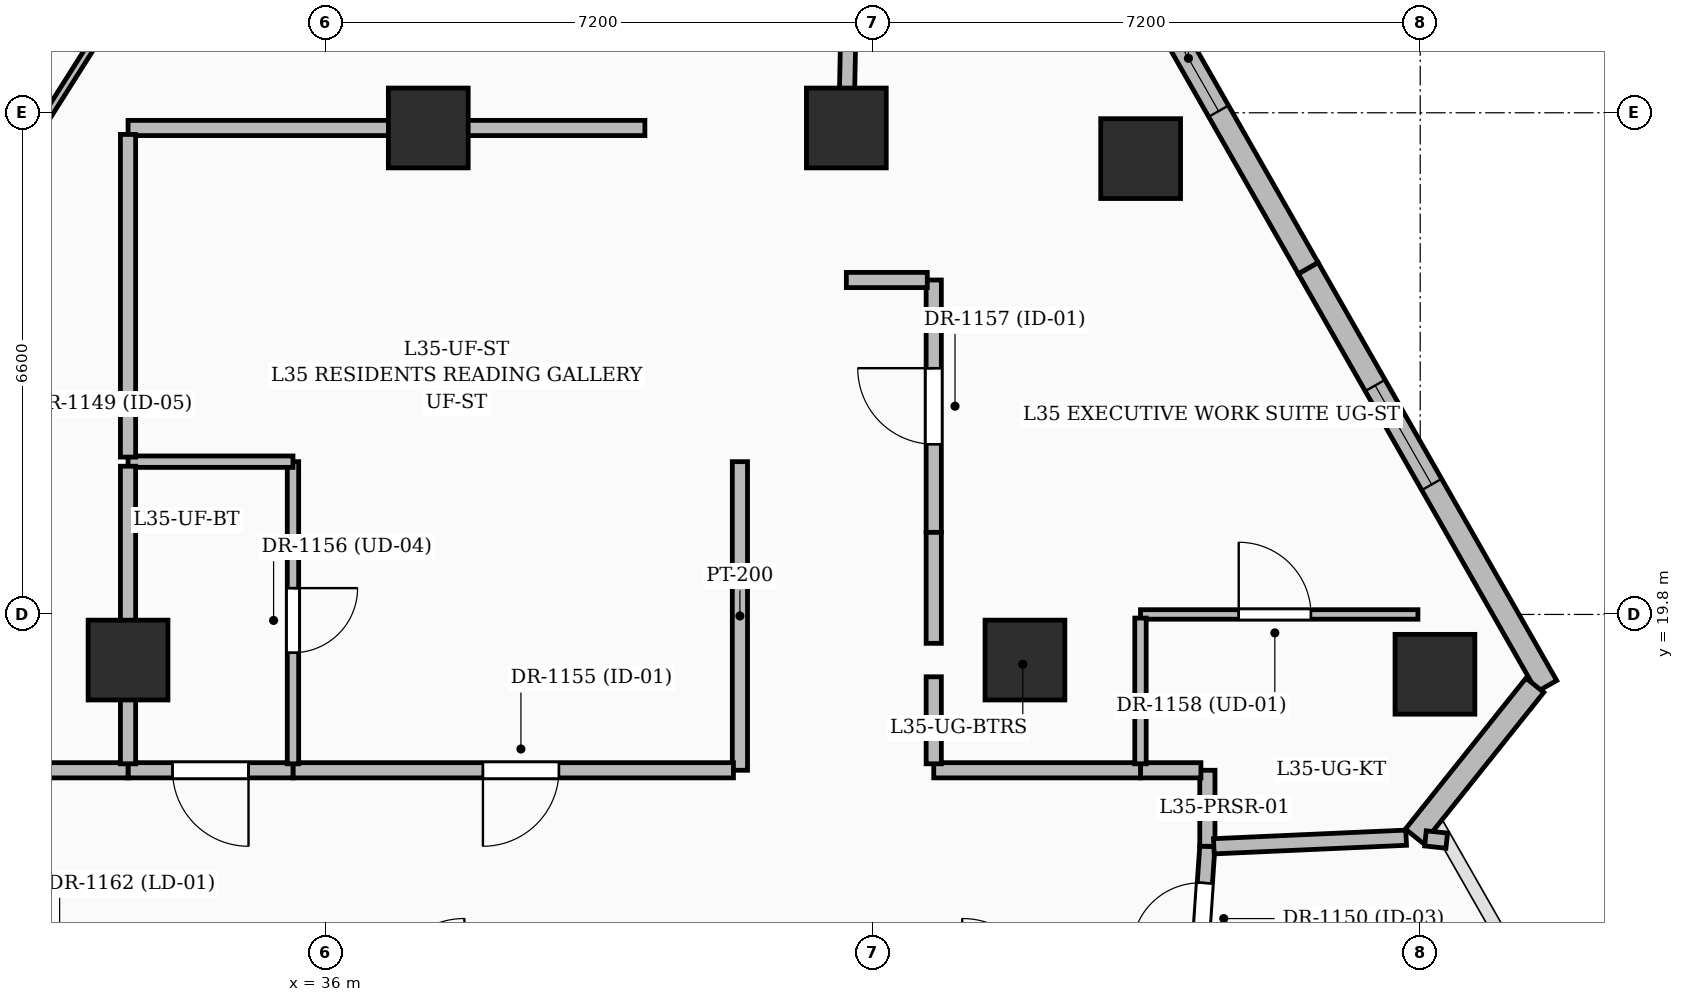
"""IFC4 building model, lengths in metres.
Left out: names, types, materials, properties, quantities, classifications, styles, units other than length and angle.
Written with IfcOpenShell. Run it as: python <this file> out.ifc"""

import sys

from ifc_helpers import new_model, si_unit, direction, frame, frame_2d, origin, origin_2d, place, context, subcontext, project, spatial, rectangle, extrude, element, fill, save


model = new_model("IFC4")
c1 = context("Model", 3, precision=1e-05, world=origin(), true_north=direction((0.0, 1.0)))
c2 = subcontext(c1, "Body", "Model", "MODEL_VIEW")
j1 = project(units=[si_unit("LENGTHUNIT", "METRE"), si_unit("PLANEANGLEUNIT", "RADIAN")], contexts=[c1])
p1 = place(None, origin())
s1 = spatial("IfcSite", under=j1, at=p1, CompositionType="ELEMENT")
p2 = place(p1, origin())
s2 = spatial("IfcBuilding", under=s1, at=p2, CompositionType="ELEMENT")
p3 = place(p2, frame((0.0, 0.0, 139.2)))
s3 = spatial("IfcBuildingStorey", under=s2, at=p3, CompositionType="ELEMENT", Elevation=139.2)
for number, where, z_axis, x_axis in (
    (1, (45.2, 19.2, 0.0), (0.0, 0.0, 1.0), (1.0, 0.0, 0.0)),
    (2, (42.85, 26.2, 0.0), (0.0, 0.0, 1.0), (1.0, 0.0, 0.0)),
    (3, (37.35, 26.2, 0.0), (0.0, 0.0, 1.0), (1.0, 0.0, 0.0)),
    (4, (33.4, 19.2, 0.0), (0.0, 0.0, 1.0), (1.0, 0.0, 0.0)),
    (5, (50.594, 19.013, 0.0), (0.0, 0.0, 1.0), (1.0, 0.0, 0.0)),
    (6, (46.722, 25.797, 0.0), (0.0, 0.0, 1.0), (1.0, 0.0, 0.0)),
):
    element("IfcColumn", number, at=place(p3, frame(where, z_axis=z_axis, x_axis=x_axis)), inside=s3, PredefinedType="COLUMN", context=c2, shape_type="SweptSolid", body=[
        extrude(rectangle(XDim=1.05, YDim=1.05, at=origin_2d()), origin(), (0.0, 0.0, 1.0), 3.6),
    ])
p4 = place(p3, frame((45.79, 29.852, 0.0), z_axis=(0.0, 0.0, 1.0), x_axis=(0.495702771017, -0.868492235317, 0.0)))
e7 = element("IfcWall", 7, at=p4, inside=s3, PredefinedType="SOLIDWALL", context=c2, shape_type="SweptSolid", body=[
    extrude(rectangle(XDim=6.33, YDim=0.3, at=frame_2d((3.165, 0.0))), origin(), (0.0, 0.0, 1.0), 3.35),
])
p5 = place(p4, frame((2.35, 0.0, 0.55)))
e8 = element("IfcOpeningElement", 8, at=p5, cuts=e7, PredefinedType="OPENING", context=c2, shape_type="SweptSolid", body=[
    extrude(rectangle(XDim=1.6, YDim=2.2, at=frame_2d((0.8, 1.1))), frame((0.0, 0.16, 0.0), z_axis=(0.0, -1.0, 0.0), x_axis=(1.0, 0.0, 0.0)), (0.0, 0.0, 1.0), 0.32),
])
p6 = place(p3, frame((48.927, 24.354, 0.0), z_axis=(0.0, 0.0, 1.0), x_axis=(0.495702771017, -0.868492235317, 0.0)))
e9 = element("IfcWall", 9, at=p6, inside=s3, PredefinedType="SOLIDWALL", context=c2, shape_type="SweptSolid", body=[
    extrude(rectangle(XDim=6.33, YDim=0.3, at=frame_2d((3.165, 0.0))), origin(), (0.0, 0.0, 1.0), 3.35),
])
p7 = place(p6, frame((1.775, 0.0, 0.6)))
e10 = element("IfcOpeningElement", 10, at=p7, cuts=e9, PredefinedType="OPENING", context=c2, shape_type="SweptSolid", body=[
    extrude(rectangle(XDim=1.5, YDim=2.1, at=frame_2d((0.75, 1.05))), frame((0.0, 0.16, 0.0), z_axis=(0.0, -1.0, 0.0), x_axis=(1.0, 0.0, 0.0)), (0.0, 0.0, 1.0), 0.32),
])
p8 = place(p3, frame((51.909, 18.869, 0.0), z_axis=(0.0, 0.0, 1.0), x_axis=(-0.624062389724, -0.781374515666, 0.0)))
e11 = element("IfcWall", 11, at=p8, inside=s3, PredefinedType="SOLIDWALL", context=c2, shape_type="SweptSolid", body=[
    extrude(rectangle(XDim=2.542, YDim=0.3, at=frame_2d((1.271, 0.0))), origin(), (0.0, 0.0, 1.0), 2.575),
])
p9 = place(p3, frame((51.449, 15.334, 0.0), z_axis=(0.0, 0.0, 1.0), x_axis=(0.990155518745, 0.139971599617, 0.0)))
e12 = element("IfcWall", 12, at=p9, inside=s3, PredefinedType="SOLIDWALL", context=c2, shape_type="SweptSolid", body=[
    extrude(rectangle(XDim=2.594, YDim=0.3, at=frame_2d((1.297, 0.0))), origin(), (0.0, 0.0, 1.0), 2.575),
])
p10 = place(p3, frame((47.425, 14.2, 0.0), z_axis=(0.0, 0.0, 1.0), x_axis=(0.068484119878, 0.997652206595, 0.0)))
e13 = element("IfcWall", 13, at=p10, inside=s3, PredefinedType="PARTITIONING", context=c2, shape_type="SweptSolid", body=[
    extrude(rectangle(XDim=2.556, YDim=0.2, at=frame_2d((1.278, 0.0))), origin(), (0.0, 0.0, 1.0), 2.393),
])
p11 = place(p10, frame((1.172, 0.0, 0.0)))
e14 = element("IfcOpeningElement", 14, at=p11, cuts=e13, PredefinedType="OPENING", context=c2, shape_type="SweptSolid", body=[
    extrude(rectangle(XDim=0.9, YDim=2.1, at=frame_2d((0.45, 1.05))), frame((0.0, 0.11, 0.0), z_axis=(0.0, -1.0, 0.0), x_axis=(1.0, 0.0, 0.0)), (0.0, 0.0, 1.0), 0.22),
])
p12 = place(p3, frame((41.45, 21.81, 0.0), z_axis=(0.0, 0.0, 1.0), x_axis=(0.0, -1.0, 0.0)))
e15 = element("IfcWall", 15, at=p12, inside=s3, PredefinedType="PARTITIONING", context=c2, shape_type="SweptSolid", body=[
    extrude(rectangle(XDim=4.06, YDim=0.2, at=frame_2d((2.03, 0.0))), origin(), (0.0, 0.0, 1.0), 3.35),
])
p13 = place(p3, frame((41.365, 17.75, 0.0), z_axis=(0.0, 0.0, 1.0), x_axis=(-1.0, 0.0, 0.0)))
e16 = element("IfcWall", 16, at=p13, inside=s3, PredefinedType="PARTITIONING", context=c2, shape_type="SweptSolid", body=[
    extrude(rectangle(XDim=5.795, YDim=0.2, at=frame_2d((2.897, 0.0))), origin(), (0.0, 0.0, 1.0), 3.35),
])
p14 = place(p13, frame((2.296, 0.0, 0.0)))
e17 = element("IfcOpeningElement", 17, at=p14, cuts=e16, PredefinedType="OPENING", context=c2, shape_type="SweptSolid", body=[
    extrude(rectangle(XDim=1.0, YDim=2.2, at=frame_2d((0.5, 1.1))), frame((0.0, 0.11, 0.0), z_axis=(0.0, -1.0, 0.0), x_axis=(1.0, 0.0, 0.0)), (0.0, 0.0, 1.0), 0.22),
])
p15 = place(p3, frame((35.57, 17.75, 0.0), z_axis=(0.0, 0.0, 1.0), x_axis=(-1.0, 0.0, 0.0)))
e18 = element("IfcWall", 18, at=p15, inside=s3, PredefinedType="PARTITIONING", context=c2, shape_type="SweptSolid", body=[
    extrude(rectangle(XDim=2.17, YDim=0.2, at=frame_2d((1.085, 0.0))), origin(), (0.0, 0.0, 1.0), 2.436),
])
p16 = place(p15, frame((0.585, 0.0, 0.0)))
e19 = element("IfcOpeningElement", 19, at=p16, cuts=e18, PredefinedType="OPENING", context=c2, shape_type="SweptSolid", body=[
    extrude(rectangle(XDim=1.0, YDim=2.2, at=frame_2d((0.5, 1.1))), frame((0.0, 0.11, 0.0), z_axis=(0.0, -1.0, 0.0), x_axis=(1.0, 0.0, 0.0)), (0.0, 0.0, 1.0), 0.22),
])
p17 = place(p3, frame((44.0, 20.88, 0.0), z_axis=(0.0, 0.0, 1.0), x_axis=(0.0, 1.0, 0.0)))
e20 = element("IfcWall", 20, at=p17, inside=s3, PredefinedType="PARTITIONING", context=c2, shape_type="SweptSolid", body=[
    extrude(rectangle(XDim=3.32, YDim=0.2, at=frame_2d((1.66, 0.0))), origin(), (0.0, 0.0, 1.0), 2.436),
])
p18 = place(p17, frame((1.16, 0.0, 0.0)))
e21 = element("IfcOpeningElement", 21, at=p18, cuts=e20, PredefinedType="OPENING", context=c2, shape_type="SweptSolid", body=[
    extrude(rectangle(XDim=1.0, YDim=2.2, at=frame_2d((0.5, 1.1))), frame((0.0, 0.11, 0.0), z_axis=(0.0, -1.0, 0.0), x_axis=(1.0, 0.0, 0.0)), (0.0, 0.0, 1.0), 0.22),
])
p19 = place(p3, frame((43.915, 24.2, 0.0), z_axis=(0.0, 0.0, 1.0), x_axis=(-1.0, 0.0, 0.0)))
e22 = element("IfcWall", 22, at=p19, inside=s3, PredefinedType="PARTITIONING", context=c2, shape_type="SweptSolid", body=[
    extrude(rectangle(XDim=1.065, YDim=0.2, at=frame_2d((0.532, 0.0))), origin(), (0.0, 0.0, 1.0), 2.436),
])
p20 = place(p3, frame((47.6, 16.75, 0.0), z_axis=(0.0, 0.0, 1.0), x_axis=(0.0, 1.0, 0.0)))
e23 = element("IfcWall", 23, at=p20, inside=s3, PredefinedType="PARTITIONING", context=c2, shape_type="SweptSolid", body=[
    extrude(rectangle(XDim=1.0, YDim=0.2, at=frame_2d((0.5, 0.0))), origin(), (0.0, 0.0, 1.0), 3.35),
])
p21 = place(p3, frame((47.515, 17.75, 0.0), z_axis=(0.0, 0.0, 1.0), x_axis=(-1.0, 0.0, 0.0)))
e24 = element("IfcWall", 24, at=p21, inside=s3, PredefinedType="PARTITIONING", context=c2, shape_type="SweptSolid", body=[
    extrude(rectangle(XDim=0.795, YDim=0.2, at=frame_2d((0.397, 0.0))), origin(), (0.0, 0.0, 1.0), 3.35),
])
p22 = place(p3, frame((46.72, 17.75, 0.0), z_axis=(0.0, 0.0, 1.0), x_axis=(-1.0, 0.0, 0.0)))
e25 = element("IfcWall", 25, at=p22, inside=s3, PredefinedType="PARTITIONING", context=c2, shape_type="SweptSolid", body=[
    extrude(rectangle(XDim=2.72, YDim=0.2, at=frame_2d((1.36, 0.0))), origin(), (0.0, 0.0, 1.0), 2.436),
])
p23 = place(p3, frame((44.0, 17.835, 0.0), z_axis=(0.0, 0.0, 1.0), x_axis=(0.0, 1.0, 0.0)))
e26 = element("IfcWall", 26, at=p23, inside=s3, PredefinedType="PARTITIONING", context=c2, shape_type="SweptSolid", body=[
    extrude(rectangle(XDim=1.145, YDim=0.2, at=frame_2d((0.573, 0.0))), origin(), (0.0, 0.0, 1.0), 3.35),
])
p24 = place(p3, frame((33.4, 17.75, 0.0), z_axis=(0.0, 0.0, 1.0), x_axis=(-1.0, 0.0, 0.0)))
e27 = element("IfcWall", 27, at=p24, inside=s3, PredefinedType="PARTITIONING", context=c2, shape_type="SweptSolid", body=[
    extrude(rectangle(XDim=1.45, YDim=0.2, at=frame_2d((0.725, 0.0))), origin(), (0.0, 0.0, 1.0), 3.35),
])
p25 = place(p3, frame((50.215, 16.863, 0.0), z_axis=(0.0, 0.0, 1.0), x_axis=(-0.999003421761, -0.04463365669, 0.0)))
e28 = element("IfcWall", 28, at=p25, inside=s3, PredefinedType="PARTITIONING", context=c2, shape_type="SweptSolid", body=[
    extrude(rectangle(XDim=2.532, YDim=0.2, at=frame_2d((1.266, 0.0))), origin(), (0.0, 0.0, 1.0), 2.393),
])
p26 = place(p3, frame((50.749, 16.824, 0.0), z_axis=(0.0, 0.0, 1.0), x_axis=(-0.994299311312, 0.106624947944, 0.0)))
e29 = element("IfcWall", 29, at=p26, inside=s3, PredefinedType="PARTITIONING", context=c2, shape_type="SweptSolid", body=[
    extrude(rectangle(XDim=0.282, YDim=0.2, at=frame_2d((0.141, 0.0))), origin(), (0.0, 0.0, 1.0), 3.35),
])
p27 = place(p3, frame((35.57, 21.81, 0.0), z_axis=(0.0, 0.0, 1.0), x_axis=(0.0, -1.0, 0.0)))
e30 = element("IfcWall", 30, at=p27, inside=s3, PredefinedType="PARTITIONING", context=c2, shape_type="SweptSolid", body=[
    extrude(rectangle(XDim=3.975, YDim=0.15, at=frame_2d((1.988, 0.0))), origin(), (0.0, 0.0, 1.0), 3.35),
])
p28 = place(p27, frame((1.664, 0.0, 0.0)))
e31 = element("IfcOpeningElement", 31, at=p28, cuts=e30, PredefinedType="OPENING", context=c2, shape_type="SweptSolid", body=[
    extrude(rectangle(XDim=0.85, YDim=2.1, at=frame_2d((0.425, 1.05))), frame((0.0, 0.085, 0.0), z_axis=(0.0, -1.0, 0.0), x_axis=(1.0, 0.0, 0.0)), (0.0, 0.0, 1.0), 0.17),
])
p29 = place(p3, frame((33.4, 21.81, 0.0), z_axis=(0.0, 0.0, 1.0), x_axis=(1.0, 0.0, 0.0)))
e32 = element("IfcWall", 32, at=p29, inside=s3, PredefinedType="PARTITIONING", context=c2, shape_type="SweptSolid", body=[
    extrude(rectangle(XDim=2.17, YDim=0.15, at=frame_2d((1.085, 0.0))), origin(), (0.0, 0.0, 1.0), 2.436),
])
p30 = place(p3, frame((40.2, 26.2, 0.0), z_axis=(0.0, 0.0, 1.0), x_axis=(-1.0, 0.0, 0.0)))
e33 = element("IfcWall", 33, at=p30, inside=s3, PredefinedType="PARTITIONING", context=c2, shape_type="SweptSolid", body=[
    extrude(rectangle(XDim=6.8, YDim=0.2, at=frame_2d((3.4, 0.0))), origin(), (0.0, 0.0, 1.0), 2.436),
])
p31 = place(p3, frame((33.4, 26.115, 0.0), z_axis=(0.0, 0.0, 1.0), x_axis=(0.0, -1.0, 0.0)))
e34 = element("IfcWall", 34, at=p31, inside=s3, PredefinedType="PARTITIONING", context=c2, shape_type="SweptSolid", body=[
    extrude(rectangle(XDim=4.245, YDim=0.2, at=frame_2d((2.123, 0.0))), origin(), (0.0, 0.0, 1.0), 2.712),
])
p32 = place(p3, frame((33.4, 21.75, 0.0), z_axis=(0.0, 0.0, 1.0), x_axis=(0.0, -1.0, 0.0)))
e35 = element("IfcWall", 35, at=p32, inside=s3, PredefinedType="PARTITIONING", context=c2, shape_type="SweptSolid", body=[
    extrude(rectangle(XDim=3.915, YDim=0.2, at=frame_2d((1.958, 0.0))), origin(), (0.0, 0.0, 1.0), 2.436),
])
p33 = place(p3, frame((46.72, 19.8, 0.0), z_axis=(0.0, 0.0, 1.0), x_axis=(1.0, 0.0, 0.0)))
e36 = element("IfcWall", 36, at=p33, inside=s3, PredefinedType="PARTITIONING", context=c2, shape_type="SweptSolid", body=[
    extrude(rectangle(XDim=3.65, YDim=0.125, at=frame_2d((1.825, 0.0))), origin(), (0.0, 0.0, 1.0), 2.57),
])
p34 = place(p33, frame((1.292, 0.0, 0.0)))
e37 = element("IfcOpeningElement", 37, at=p34, cuts=e36, PredefinedType="OPENING", context=c2, shape_type="SweptSolid", body=[
    extrude(rectangle(XDim=0.95, YDim=2.2, at=frame_2d((0.475, 1.1))), frame((0.0, 0.072, 0.0), z_axis=(0.0, -1.0, 0.0), x_axis=(1.0, 0.0, 0.0)), (0.0, 0.0, 1.0), 0.145),
])
p35 = place(p3, frame((43.013, 34.402, 0.0), z_axis=(0.0, 0.0, 1.0), x_axis=(-0.019849642377, -0.99980297644, 0.0)))
e38 = element("IfcWall", 38, at=p35, inside=s3, PredefinedType="PARTITIONING", context=c2, shape_type="SweptSolid", body=[
    extrude(rectangle(XDim=8.204, YDim=0.2, at=frame_2d((4.102, 0.0))), origin(), (0.0, 0.0, 1.0), 2.393),
])
p36 = place(p3, frame((46.72, 19.752, 0.0), z_axis=(0.0, 0.0, 1.0), x_axis=(0.0, -1.0, 0.0)))
e39 = element("IfcWall", 39, at=p36, inside=s3, PredefinedType="PARTITIONING", context=c2, shape_type="SweptSolid", body=[
    extrude(rectangle(XDim=1.917, YDim=0.15, at=frame_2d((0.959, 0.0))), origin(), (0.0, 0.0, 1.0), 3.35),
])
p37 = place(p3, frame((31.015, 24.272, 0.0), z_axis=(0.0, 0.0, 1.0), x_axis=(0.534598518798, 0.8451061612, 0.0)))
e40 = element("IfcWall", 40, at=p37, inside=s3, PredefinedType="PARTITIONING", context=c2, shape_type="SweptSolid", body=[
    extrude(rectangle(XDim=17.547, YDim=0.1, at=frame_2d((8.773, 0.0))), origin(), (0.0, 0.0, 1.0), 2.393),
])
p38 = place(p3, frame((44.0, 19.42, 0.0), z_axis=(0.0, 0.0, 1.0), x_axis=(0.0, 1.0, 0.0)))
e41 = element("IfcWall", 41, at=p38, inside=s3, PredefinedType="PARTITIONING", context=c2, shape_type="SweptSolid", body=[
    extrude(rectangle(XDim=1.46, YDim=0.2, at=frame_2d((0.73, 0.0))), origin(), (0.0, 0.0, 1.0), 3.35),
])
p39 = place(p5, origin())
e42 = element("IfcWindow", 42, at=p39, inside=s3, PartitioningType="SINGLE_PANEL", PredefinedType="WINDOW", context=c2, shape_type="SweptSolid", body=[
    extrude(rectangle(XDim=1.6, YDim=2.2, at=frame_2d((0.8, 1.1))), frame((0.0, 0.03, 0.0), z_axis=(0.0, -1.0, 0.0), x_axis=(1.0, 0.0, 0.0)), (0.0, 0.0, 1.0), 0.06),
])
fill(e8, e42)
p40 = place(p7, origin())
e43 = element("IfcWindow", 43, at=p40, inside=s3, PartitioningType="SINGLE_PANEL", PredefinedType="WINDOW", context=c2, shape_type="SweptSolid", body=[
    extrude(rectangle(XDim=1.5, YDim=2.1, at=frame_2d((0.75, 1.05))), frame((0.0, 0.03, 0.0), z_axis=(0.0, -1.0, 0.0), x_axis=(1.0, 0.0, 0.0)), (0.0, 0.0, 1.0), 0.06),
])
fill(e10, e43)
p41 = place(p11, origin())
e44 = element("IfcDoor", 44, at=p41, inside=s3, OperationType="SINGLE_SWING_LEFT", PredefinedType="DOOR", context=c2, shape_type="SweptSolid", body=[
    extrude(rectangle(XDim=0.9, YDim=2.1, at=frame_2d((0.45, 1.05))), frame((0.0, 0.025, 0.0), z_axis=(0.0, -1.0, 0.0), x_axis=(1.0, 0.0, 0.0)), (0.0, 0.0, 1.0), 0.05),
])
fill(e14, e44)
p42 = place(p14, origin())
e45 = element("IfcDoor", 45, at=p42, inside=s3, OperationType="SINGLE_SWING_RIGHT", PredefinedType="DOOR", context=c2, shape_type="SweptSolid", body=[
    extrude(rectangle(XDim=1.0, YDim=2.2, at=frame_2d((0.5, 1.1))), frame((0.0, 0.025, 0.0), z_axis=(0.0, -1.0, 0.0), x_axis=(1.0, 0.0, 0.0)), (0.0, 0.0, 1.0), 0.05),
])
fill(e17, e45)
p43 = place(p28, origin())
e46 = element("IfcDoor", 46, at=p43, inside=s3, OperationType="SINGLE_SWING_LEFT", PredefinedType="DOOR", context=c2, shape_type="SweptSolid", body=[
    extrude(rectangle(XDim=0.85, YDim=2.1, at=frame_2d((0.425, 1.05))), frame((0.0, 0.025, 0.0), z_axis=(0.0, -1.0, 0.0), x_axis=(1.0, 0.0, 0.0)), (0.0, 0.0, 1.0), 0.05),
])
fill(e31, e46)
p44 = place(p18, origin())
e47 = element("IfcDoor", 47, at=p44, inside=s3, OperationType="SINGLE_SWING_RIGHT", PredefinedType="DOOR", context=c2, shape_type="SweptSolid", body=[
    extrude(rectangle(XDim=1.0, YDim=2.2, at=frame_2d((0.5, 1.1))), frame((0.0, 0.025, 0.0), z_axis=(0.0, -1.0, 0.0), x_axis=(1.0, 0.0, 0.0)), (0.0, 0.0, 1.0), 0.05),
])
fill(e21, e47)
p45 = place(p34, origin())
e48 = element("IfcDoor", 48, at=p45, inside=s3, OperationType="SINGLE_SWING_LEFT", PredefinedType="DOOR", context=c2, shape_type="SweptSolid", body=[
    extrude(rectangle(XDim=0.95, YDim=2.2, at=frame_2d((0.475, 1.1))), frame((0.0, 0.025, 0.0), z_axis=(0.0, -1.0, 0.0), x_axis=(1.0, 0.0, 0.0)), (0.0, 0.0, 1.0), 0.05),
])
fill(e37, e48)
p46 = place(p16, origin())
e49 = element("IfcDoor", 49, at=p46, inside=s3, OperationType="SINGLE_SWING_LEFT", PredefinedType="DOOR", context=c2, shape_type="SweptSolid", body=[
    extrude(rectangle(XDim=1.0, YDim=2.2, at=frame_2d((0.5, 1.1))), frame((0.0, 0.025, 0.0), z_axis=(0.0, -1.0, 0.0), x_axis=(1.0, 0.0, 0.0)), (0.0, 0.0, 1.0), 0.05),
])
fill(e19, e49)
save(model, sys.argv[1])
